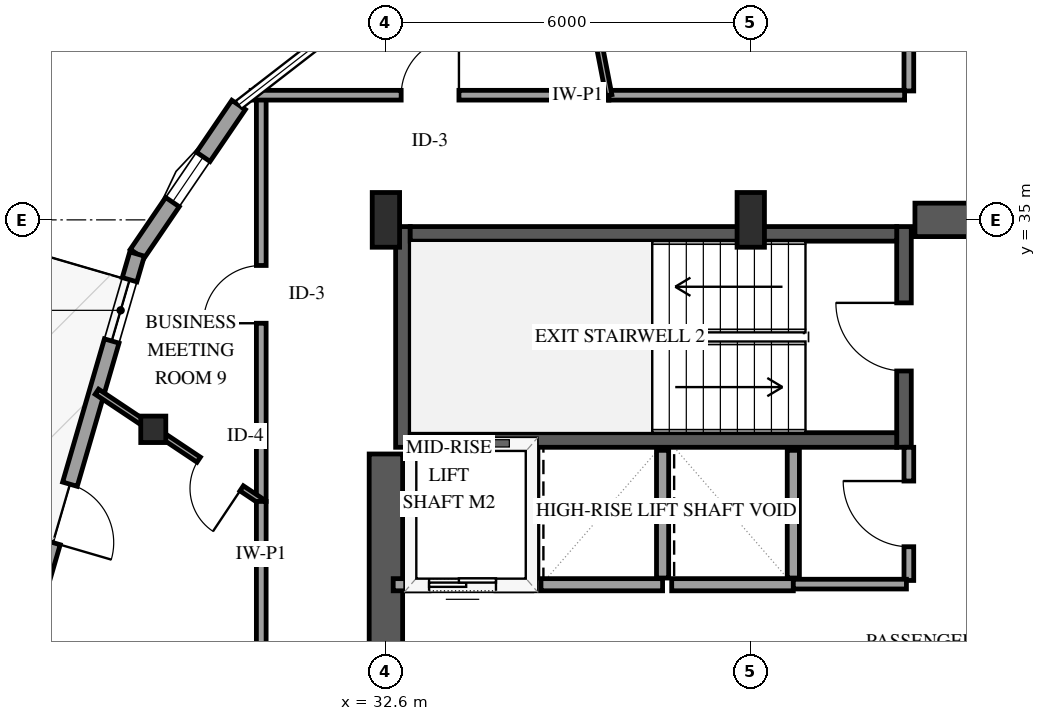
"""IFC4 building model, lengths in metres.
Left out: names, types, materials, properties, quantities, classifications, styles, units other than length and angle.
Written with IfcOpenShell. Run it as: python <this file> out.ifc"""

import sys

from ifc_helpers import new_model, si_unit, direction, frame, frame_2d, origin, origin_2d, place, context, subcontext, project, spatial, rectangle, i_section, extrude, element, fill, save


model = new_model("IFC4")
c1 = context("Model", 3, precision=1e-05, world=origin(), true_north=direction((0.0, 1.0)))
c2 = subcontext(c1, "Body", "Model", "MODEL_VIEW")
j1 = project(units=[si_unit("LENGTHUNIT", "METRE"), si_unit("PLANEANGLEUNIT", "RADIAN")], contexts=[c1])
p1 = place(None, origin())
s1 = spatial("IfcSite", under=j1, at=p1, CompositionType="ELEMENT")
p2 = place(p1, origin())
s2 = spatial("IfcBuilding", under=s1, at=p2, CompositionType="ELEMENT")
p3 = place(p2, frame((0.0, 0.0, 171.4)))
s3 = spatial("IfcBuildingStorey", under=s2, at=p3, CompositionType="ELEMENT", Elevation=171.4)
p4 = place(p3, frame((32.88, 31.26, 0.0), z_axis=(0.0, 0.0, 1.0), x_axis=(0.0, 1.0, 0.0)))
e1 = element("IfcWall", 1, at=p4, inside=s3, PredefinedType="SHEAR", context=c2, shape_type="SweptSolid", body=[
    extrude(rectangle(XDim=3.63, YDim=0.24, at=frame_2d((1.815, 0.0))), origin(), (0.0, 0.0, 1.0), 3.6),
])
p5 = place(p3, frame((41.12, 31.26, 0.0), z_axis=(0.0, 0.0, 1.0), x_axis=(0.0, 1.0, 0.0)))
e2 = element("IfcWall", 2, at=p5, inside=s3, PredefinedType="SHEAR", context=c2, shape_type="SweptSolid", body=[
    extrude(rectangle(XDim=3.63, YDim=0.24, at=frame_2d((1.815, 0.0))), origin(), (0.0, 0.0, 1.0), 3.6),
])
p6 = place(p5, frame((1.255, 0.0, 0.0)))
e3 = element("IfcOpeningElement", 3, at=p6, cuts=e2, PredefinedType="OPENING", context=c2, shape_type="SweptSolid", body=[
    extrude(rectangle(XDim=1.12, YDim=2.15, at=frame_2d((0.56, 1.075))), frame((0.0, 0.13, 0.0), z_axis=(0.0, -1.0, 0.0), x_axis=(1.0, 0.0, 0.0)), (0.0, 0.0, 1.0), 0.26),
])
for number, where, z_axis, x_axis in (
    (4, (33.0, 31.38, 0.0), (0.0, 0.0, 1.0), (1.0, 0.0, 0.0)),
    (5, (33.0, 34.77, 0.0), (0.0, 0.0, 1.0), (1.0, 0.0, 0.0)),
):
    element("IfcWall", number, at=place(p3, frame(where, z_axis=z_axis, x_axis=x_axis)), inside=s3, PredefinedType="SHEAR", context=c2, shape_type="SweptSolid", body=[
        extrude(rectangle(XDim=8.0, YDim=0.24, at=frame_2d((4.0, 0.0))), origin(), (0.0, 0.0, 1.0), 3.6),
    ])
p7 = place(p3, frame((32.6, 18.85, 0.0), z_axis=(0.0, 0.0, 1.0), x_axis=(0.0, 1.0, 0.0)))
e6 = element("IfcWall", 6, at=p7, inside=s3, PredefinedType="SHEAR", context=c2, shape_type="SweptSolid", body=[
    extrude(rectangle(XDim=12.3, YDim=0.55, at=frame_2d((6.15, 0.0))), origin(), (0.0, 0.0, 1.0), 3.6),
])
p8 = place(p3, frame((41.3, 35.0, 0.0), z_axis=(0.0, 0.0, 1.0), x_axis=(1.0, 0.0, 0.0)))
e7 = element("IfcWall", 7, at=p8, inside=s3, PredefinedType="SHEAR", context=c2, shape_type="SweptSolid", body=[
    extrude(rectangle(XDim=2.85, YDim=0.55, at=frame_2d((1.425, 0.0))), origin(), (0.0, 0.0, 1.0), 3.6),
])
for number, where, z_axis, x_axis in (
    (8, (32.6, 35.0, 0.0), (0.0, 0.0, 1.0), (1.0, 0.0, 0.0)),
    (9, (38.6, 35.0, 0.0), (0.0, 0.0, 1.0), (1.0, 0.0, 0.0)),
):
    element("IfcColumn", number, at=place(p3, frame(where, z_axis=z_axis, x_axis=x_axis)), inside=s3, PredefinedType="PILASTER", context=c2, shape_type="SweptSolid", body=[
        extrude(rectangle(XDim=0.45, YDim=0.9, at=origin_2d()), origin(), (0.0, 0.0, 1.0), 3.6),
    ])
p9 = place(p3, frame((28.774, 31.556, 0.0), z_axis=(0.0, 0.0, 1.0), x_axis=(1.0, 0.0, 0.0)))
e10 = element("IfcColumn", 10, at=p9, inside=s3, PredefinedType="COLUMN", context=c2, shape_type="SweptSolid", body=[
    extrude(i_section(OverallWidth=0.412, OverallDepth=0.435, WebThickness=0.036, FlangeThickness=0.057, FilletRadius=0.038, at=origin_2d()), origin(), (0.0, 0.0, 1.0), 3.6),
])
p10 = place(p3, frame((30.178, 36.89, 0.0), z_axis=(0.0, 0.0, 1.0), x_axis=(-0.563009904687, -0.826450148058, 0.0)))
e11 = element("IfcWall", 11, at=p10, inside=s3, PredefinedType="SOLIDWALL", context=c2, shape_type="SweptSolid", body=[
    extrude(rectangle(XDim=2.967, YDim=0.27, at=frame_2d((1.483, 0.0))), origin(), (0.0, 0.0, 1.0), 2.679),
])
p11 = place(p10, frame((1.033, 0.0, 0.75)))
e12 = element("IfcOpeningElement", 12, at=p11, cuts=e11, PredefinedType="OPENING", context=c2, shape_type="SweptSolid", body=[
    extrude(rectangle(XDim=0.9, YDim=1.5, at=frame_2d((0.45, 0.75))), frame((0.0, 0.145, 0.0), z_axis=(0.0, -1.0, 0.0), x_axis=(1.0, 0.0, 0.0)), (0.0, 0.0, 1.0), 0.29),
])
p12 = place(p3, frame((28.508, 34.439, 0.0), z_axis=(0.0, 0.0, 1.0), x_axis=(-0.28, -0.96, 0.0)))
e13 = element("IfcWall", 13, at=p12, inside=s3, PredefinedType="SOLIDWALL", context=c2, shape_type="SweptSolid", body=[
    extrude(rectangle(XDim=8.887, YDim=0.25, at=frame_2d((4.443, 0.0))), origin(), (0.0, 0.0, 1.0), 2.679),
])
p13 = place(p12, frame((3.943, 0.0, 0.0)))
e14 = element("IfcOpeningElement", 14, at=p13, cuts=e13, PredefinedType="OPENING", context=c2, shape_type="SweptSolid", body=[
    extrude(rectangle(XDim=1.0, YDim=2.15, at=frame_2d((0.5, 1.075))), frame((0.0, 0.135, 0.0), z_axis=(0.0, -1.0, 0.0), x_axis=(1.0, 0.0, 0.0)), (0.0, 0.0, 1.0), 0.27),
])
p14 = place(p12, frame((0.44, 0.0, 0.72)))
e15 = element("IfcOpeningElement", 15, at=p14, cuts=e13, PredefinedType="OPENING", context=c2, shape_type="SweptSolid", body=[
    extrude(rectangle(XDim=1.05, YDim=1.55, at=frame_2d((0.525, 0.775))), frame((0.0, 0.135, 0.0), z_axis=(0.0, -1.0, 0.0), x_axis=(1.0, 0.0, 0.0)), (0.0, 0.0, 1.0), 0.27),
])
p15 = place(p12, frame((5.583, 0.0, 0.72)))
e16 = element("IfcOpeningElement", 16, at=p15, cuts=e13, PredefinedType="OPENING", context=c2, shape_type="SweptSolid", body=[
    extrude(rectangle(XDim=1.05, YDim=1.55, at=frame_2d((0.525, 0.775))), frame((0.0, 0.135, 0.0), z_axis=(0.0, -1.0, 0.0), x_axis=(1.0, 0.0, 0.0)), (0.0, 0.0, 1.0), 0.27),
])
p16 = place(p3, frame((32.72, 29.0, 0.0), z_axis=(0.0, 0.0, 1.0), x_axis=(1.0, 0.0, 0.0)))
e17 = element("IfcWall", 17, at=p16, inside=s3, PredefinedType="SOLIDWALL", context=c2, shape_type="SweptSolid", body=[
    extrude(rectangle(XDim=2.28, YDim=0.2, at=frame_2d((1.14, 0.0))), origin(), (0.0, 0.0, 1.0), 2.674),
])
p17 = place(p16, frame((0.59, 0.0, 0.0)))
e18 = element("IfcOpeningElement", 18, at=p17, cuts=e17, PredefinedType="OPENING", context=c2, shape_type="SweptSolid", body=[
    extrude(rectangle(XDim=1.1, YDim=2.15, at=frame_2d((0.55, 1.075))), frame((0.0, 0.11, 0.0), z_axis=(0.0, -1.0, 0.0), x_axis=(1.0, 0.0, 0.0)), (0.0, 0.0, 1.0), 0.22),
])
p18 = place(p3, frame((35.0, 29.11, 0.0), z_axis=(0.0, 0.0, 1.0), x_axis=(0.0, 1.0, 0.0)))
e19 = element("IfcWall", 19, at=p18, inside=s3, PredefinedType="SOLIDWALL", context=c2, shape_type="SweptSolid", body=[
    extrude(rectangle(XDim=2.1, YDim=0.2, at=frame_2d((1.05, 0.0))), origin(), (0.0, 0.0, 1.0), 3.3),
])
p19 = place(p3, frame((35.15, 29.0, 0.0), z_axis=(0.0, 0.0, 1.0), x_axis=(1.0, 0.0, 0.0)))
e20 = element("IfcWall", 20, at=p19, inside=s3, PredefinedType="SOLIDWALL", context=c2, shape_type="SweptSolid", body=[
    extrude(rectangle(XDim=2.0, YDim=0.2, at=frame_2d((1.0, 0.0))), origin(), (0.0, 0.0, 1.0), 2.674),
])
p20 = place(p3, frame((37.15, 29.11, 0.0), z_axis=(0.0, 0.0, 1.0), x_axis=(0.0, 1.0, 0.0)))
e21 = element("IfcWall", 21, at=p20, inside=s3, PredefinedType="SOLIDWALL", context=c2, shape_type="SweptSolid", body=[
    extrude(rectangle(XDim=2.1, YDim=0.2, at=frame_2d((1.05, 0.0))), origin(), (0.0, 0.0, 1.0), 3.3),
])
p21 = place(p3, frame((37.3, 29.0, 0.0), z_axis=(0.0, 0.0, 1.0), x_axis=(1.0, 0.0, 0.0)))
e22 = element("IfcWall", 22, at=p21, inside=s3, PredefinedType="SOLIDWALL", context=c2, shape_type="SweptSolid", body=[
    extrude(rectangle(XDim=2.0, YDim=0.2, at=frame_2d((1.0, 0.0))), origin(), (0.0, 0.0, 1.0), 2.674),
])
p22 = place(p3, frame((39.3, 29.11, 0.0), z_axis=(0.0, 0.0, 1.0), x_axis=(0.0, 1.0, 0.0)))
e23 = element("IfcWall", 23, at=p22, inside=s3, PredefinedType="SOLIDWALL", context=c2, shape_type="SweptSolid", body=[
    extrude(rectangle(XDim=2.1, YDim=0.2, at=frame_2d((1.05, 0.0))), origin(), (0.0, 0.0, 1.0), 3.3),
])
p23 = place(p3, frame((30.55, 30.37, 0.0), z_axis=(0.0, 0.0, 1.0), x_axis=(0.0, 1.0, 0.0)))
e24 = element("IfcWall", 24, at=p23, inside=s3, PredefinedType="PARTITIONING", context=c2, shape_type="SweptSolid", body=[
    extrude(rectangle(XDim=6.809, YDim=0.16, at=frame_2d((3.404, 0.0))), origin(), (0.0, 0.0, 1.0), 3.3),
])
p24 = place(p23, frame((2.93, 0.0, 0.0)))
e25 = element("IfcOpeningElement", 25, at=p24, cuts=e24, PredefinedType="OPENING", context=c2, shape_type="SweptSolid", body=[
    extrude(rectangle(XDim=0.95, YDim=2.15, at=frame_2d((0.475, 1.075))), frame((0.0, 0.09, 0.0), z_axis=(0.0, -1.0, 0.0), x_axis=(1.0, 0.0, 0.0)), (0.0, 0.0, 1.0), 0.18),
])
p25 = place(p3, frame((41.2, 37.12, 0.0), z_axis=(0.0, 0.0, 1.0), x_axis=(0.0, 1.0, 0.0)))
e26 = element("IfcWall", 26, at=p25, inside=s3, PredefinedType="PARTITIONING", context=c2, shape_type="SweptSolid", body=[
    extrude(rectangle(XDim=6.248, YDim=0.16, at=frame_2d((3.124, 0.0))), origin(), (0.0, 0.0, 1.0), 2.678),
])
p26 = place(p25, frame((2.649, 0.0, 0.0)))
e27 = element("IfcOpeningElement", 27, at=p26, cuts=e26, PredefinedType="OPENING", context=c2, shape_type="SweptSolid", body=[
    extrude(rectangle(XDim=0.95, YDim=2.15, at=frame_2d((0.475, 1.075))), frame((0.0, 0.09, 0.0), z_axis=(0.0, -1.0, 0.0), x_axis=(1.0, 0.0, 0.0)), (0.0, 0.0, 1.0), 0.18),
])
p27 = place(p3, frame((30.384, 37.05, 0.0), z_axis=(0.0, 0.0, 1.0), x_axis=(1.0, 0.0, 0.0)))
e28 = element("IfcWall", 28, at=p27, inside=s3, PredefinedType="PARTITIONING", context=c2, shape_type="SweptSolid", body=[
    extrude(rectangle(XDim=5.883, YDim=0.16, at=frame_2d((2.941, 0.0))), origin(), (0.0, 0.0, 1.0), 3.3),
])
p28 = place(p27, frame((2.467, 0.0, 0.0)))
e29 = element("IfcOpeningElement", 29, at=p28, cuts=e28, PredefinedType="OPENING", context=c2, shape_type="SweptSolid", body=[
    extrude(rectangle(XDim=0.95, YDim=2.15, at=frame_2d((0.475, 1.075))), frame((0.0, 0.09, 0.0), z_axis=(0.0, -1.0, 0.0), x_axis=(1.0, 0.0, 0.0)), (0.0, 0.0, 1.0), 0.18),
])
p29 = place(p3, frame((36.267, 37.05, 0.0), z_axis=(0.0, 0.0, 1.0), x_axis=(1.0, 0.0, 0.0)))
e30 = element("IfcWall", 30, at=p29, inside=s3, PredefinedType="PARTITIONING", context=c2, shape_type="SweptSolid", body=[
    extrude(rectangle(XDim=4.863, YDim=0.16, at=frame_2d((2.431, 0.0))), origin(), (0.0, 0.0, 1.0), 3.3),
])
p30 = place(p3, frame((36.267, 37.05, 0.0), z_axis=(0.0, 0.0, 1.0), x_axis=(-0.190176227139, 0.981749969509, 0.0)))
e31 = element("IfcWall", 31, at=p30, inside=s3, PredefinedType="PARTITIONING", context=c2, shape_type="SweptSolid", body=[
    extrude(rectangle(XDim=4.034, YDim=0.1, at=frame_2d((2.017, 0.0))), origin(), (0.0, 0.0, 1.0), 2.595),
])
p31 = place(p3, frame((30.55, 30.37, 0.0), z_axis=(0.0, 0.0, 1.0), x_axis=(-0.831784371752, 0.555098873092, 0.0)))
e32 = element("IfcWall", 32, at=p31, inside=s3, PredefinedType="PARTITIONING", context=c2, shape_type="SweptSolid", body=[
    extrude(rectangle(XDim=3.25, YDim=0.1, at=frame_2d((1.625, 0.0))), origin(), (0.0, 0.0, 1.0), 3.3),
])
p32 = place(p31, frame((0.387, 0.0, 0.0)))
e33 = element("IfcOpeningElement", 33, at=p32, cuts=e32, PredefinedType="OPENING", context=c2, shape_type="SweptSolid", body=[
    extrude(rectangle(XDim=0.85, YDim=2.1, at=frame_2d((0.425, 1.05))), frame((0.0, 0.06, 0.0), z_axis=(0.0, -1.0, 0.0), x_axis=(1.0, 0.0, 0.0)), (0.0, 0.0, 1.0), 0.12),
])
p33 = place(p3, frame((41.2, 29.07, 0.0), z_axis=(0.0, 0.0, 1.0), x_axis=(0.0, 1.0, 0.0)))
e34 = element("IfcWall", 34, at=p33, inside=s3, PredefinedType="PARTITIONING", context=c2, shape_type="SweptSolid", body=[
    extrude(rectangle(XDim=2.19, YDim=0.16, at=frame_2d((1.095, 0.0))), origin(), (0.0, 0.0, 1.0), 3.3),
])
p34 = place(p33, frame((0.555, 0.0, 0.0)))
e35 = element("IfcOpeningElement", 35, at=p34, cuts=e34, PredefinedType="OPENING", context=c2, shape_type="SweptSolid", body=[
    extrude(rectangle(XDim=1.08, YDim=2.15, at=frame_2d((0.54, 1.075))), frame((0.0, 0.09, 0.0), z_axis=(0.0, -1.0, 0.0), x_axis=(1.0, 0.0, 0.0)), (0.0, 0.0, 1.0), 0.18),
])
p35 = place(p3, frame((39.3, 29.01, 0.0), z_axis=(0.0, 0.0, 1.0), x_axis=(1.0, 0.0, 0.0)))
e36 = element("IfcWall", 36, at=p35, inside=s3, PredefinedType="PARTITIONING", context=c2, shape_type="SweptSolid", body=[
    extrude(rectangle(XDim=1.86, YDim=0.16, at=frame_2d((0.93, 0.0))), origin(), (0.0, 0.0, 1.0), 2.674),
])
p36 = place(p3, frame((30.55, 21.826, 0.0), z_axis=(0.0, 0.0, 1.0), x_axis=(0.0, 1.0, 0.0)))
e37 = element("IfcWall", 37, at=p36, inside=s3, PredefinedType="PARTITIONING", context=c2, shape_type="SweptSolid", body=[
    extrude(rectangle(XDim=8.544, YDim=0.16, at=frame_2d((4.272, 0.0))), origin(), (0.0, 0.0, 1.0), 3.3),
])
p37 = place(p11, origin())
e38 = element("IfcWindow", 38, at=p37, inside=s3, PartitioningType="SINGLE_PANEL", PredefinedType="WINDOW", context=c2, shape_type="SweptSolid", body=[
    extrude(rectangle(XDim=0.9, YDim=1.5, at=frame_2d((0.45, 0.75))), frame((0.0, 0.03, 0.0), z_axis=(0.0, -1.0, 0.0), x_axis=(1.0, 0.0, 0.0)), (0.0, 0.0, 1.0), 0.06),
])
fill(e12, e38)
p38 = place(p13, origin())
e39 = element("IfcDoor", 39, at=p38, inside=s3, OperationType="SINGLE_SWING_RIGHT", PredefinedType="DOOR", context=c2, shape_type="SweptSolid", body=[
    extrude(rectangle(XDim=1.0, YDim=2.15, at=frame_2d((0.5, 1.075))), frame((0.0, 0.025, 0.0), z_axis=(0.0, -1.0, 0.0), x_axis=(1.0, 0.0, 0.0)), (0.0, 0.0, 1.0), 0.05),
])
fill(e14, e39)
p39 = place(p14, origin())
e40 = element("IfcWindow", 40, at=p39, inside=s3, PartitioningType="SINGLE_PANEL", PredefinedType="WINDOW", context=c2, shape_type="SweptSolid", body=[
    extrude(rectangle(XDim=1.05, YDim=1.55, at=frame_2d((0.525, 0.775))), frame((0.0, 0.03, 0.0), z_axis=(0.0, -1.0, 0.0), x_axis=(1.0, 0.0, 0.0)), (0.0, 0.0, 1.0), 0.06),
])
fill(e15, e40)
p40 = place(p17, origin())
e41 = element("IfcDoor", 41, at=p40, inside=s3, OperationType="SLIDING_TO_LEFT", PredefinedType="DOOR", context=c2, shape_type="SweptSolid", body=[
    extrude(rectangle(XDim=1.1, YDim=2.15, at=frame_2d((0.55, 1.075))), frame((0.0, 0.025, 0.0), z_axis=(0.0, -1.0, 0.0), x_axis=(1.0, 0.0, 0.0)), (0.0, 0.0, 1.0), 0.05),
])
fill(e18, e41)
p41 = place(p6, origin())
e42 = element("IfcDoor", 42, at=p41, inside=s3, OperationType="SINGLE_SWING_RIGHT", PredefinedType="DOOR", context=c2, shape_type="SweptSolid", body=[
    extrude(rectangle(XDim=1.12, YDim=2.15, at=frame_2d((0.56, 1.075))), frame((0.0, 0.025, 0.0), z_axis=(0.0, -1.0, 0.0), x_axis=(1.0, 0.0, 0.0)), (0.0, 0.0, 1.0), 0.05),
])
fill(e3, e42)
p42 = place(p24, origin())
e43 = element("IfcDoor", 43, at=p42, inside=s3, OperationType="SINGLE_SWING_LEFT", PredefinedType="DOOR", context=c2, shape_type="SweptSolid", body=[
    extrude(rectangle(XDim=0.95, YDim=2.15, at=frame_2d((0.475, 1.075))), frame((0.0, 0.025, 0.0), z_axis=(0.0, -1.0, 0.0), x_axis=(1.0, 0.0, 0.0)), (0.0, 0.0, 1.0), 0.05),
])
fill(e25, e43)
p43 = place(p28, origin())
e44 = element("IfcDoor", 44, at=p43, inside=s3, OperationType="SINGLE_SWING_RIGHT", PredefinedType="DOOR", context=c2, shape_type="SweptSolid", body=[
    extrude(rectangle(XDim=0.95, YDim=2.15, at=frame_2d((0.475, 1.075))), frame((0.0, 0.025, 0.0), z_axis=(0.0, -1.0, 0.0), x_axis=(1.0, 0.0, 0.0)), (0.0, 0.0, 1.0), 0.05),
])
fill(e29, e44)
p44 = place(p32, origin())
e45 = element("IfcDoor", 45, at=p44, inside=s3, OperationType="SINGLE_SWING_LEFT", PredefinedType="DOOR", context=c2, shape_type="SweptSolid", body=[
    extrude(rectangle(XDim=0.85, YDim=2.1, at=frame_2d((0.425, 1.05))), frame((0.0, 0.025, 0.0), z_axis=(0.0, -1.0, 0.0), x_axis=(1.0, 0.0, 0.0)), (0.0, 0.0, 1.0), 0.05),
])
fill(e33, e45)
p45 = place(p34, origin())
e46 = element("IfcDoor", 46, at=p45, inside=s3, OperationType="SINGLE_SWING_RIGHT", PredefinedType="DOOR", context=c2, shape_type="SweptSolid", body=[
    extrude(rectangle(XDim=1.08, YDim=2.15, at=frame_2d((0.54, 1.075))), frame((0.0, 0.025, 0.0), z_axis=(0.0, -1.0, 0.0), x_axis=(1.0, 0.0, 0.0)), (0.0, 0.0, 1.0), 0.05),
])
fill(e35, e46)
save(model, sys.argv[1])
